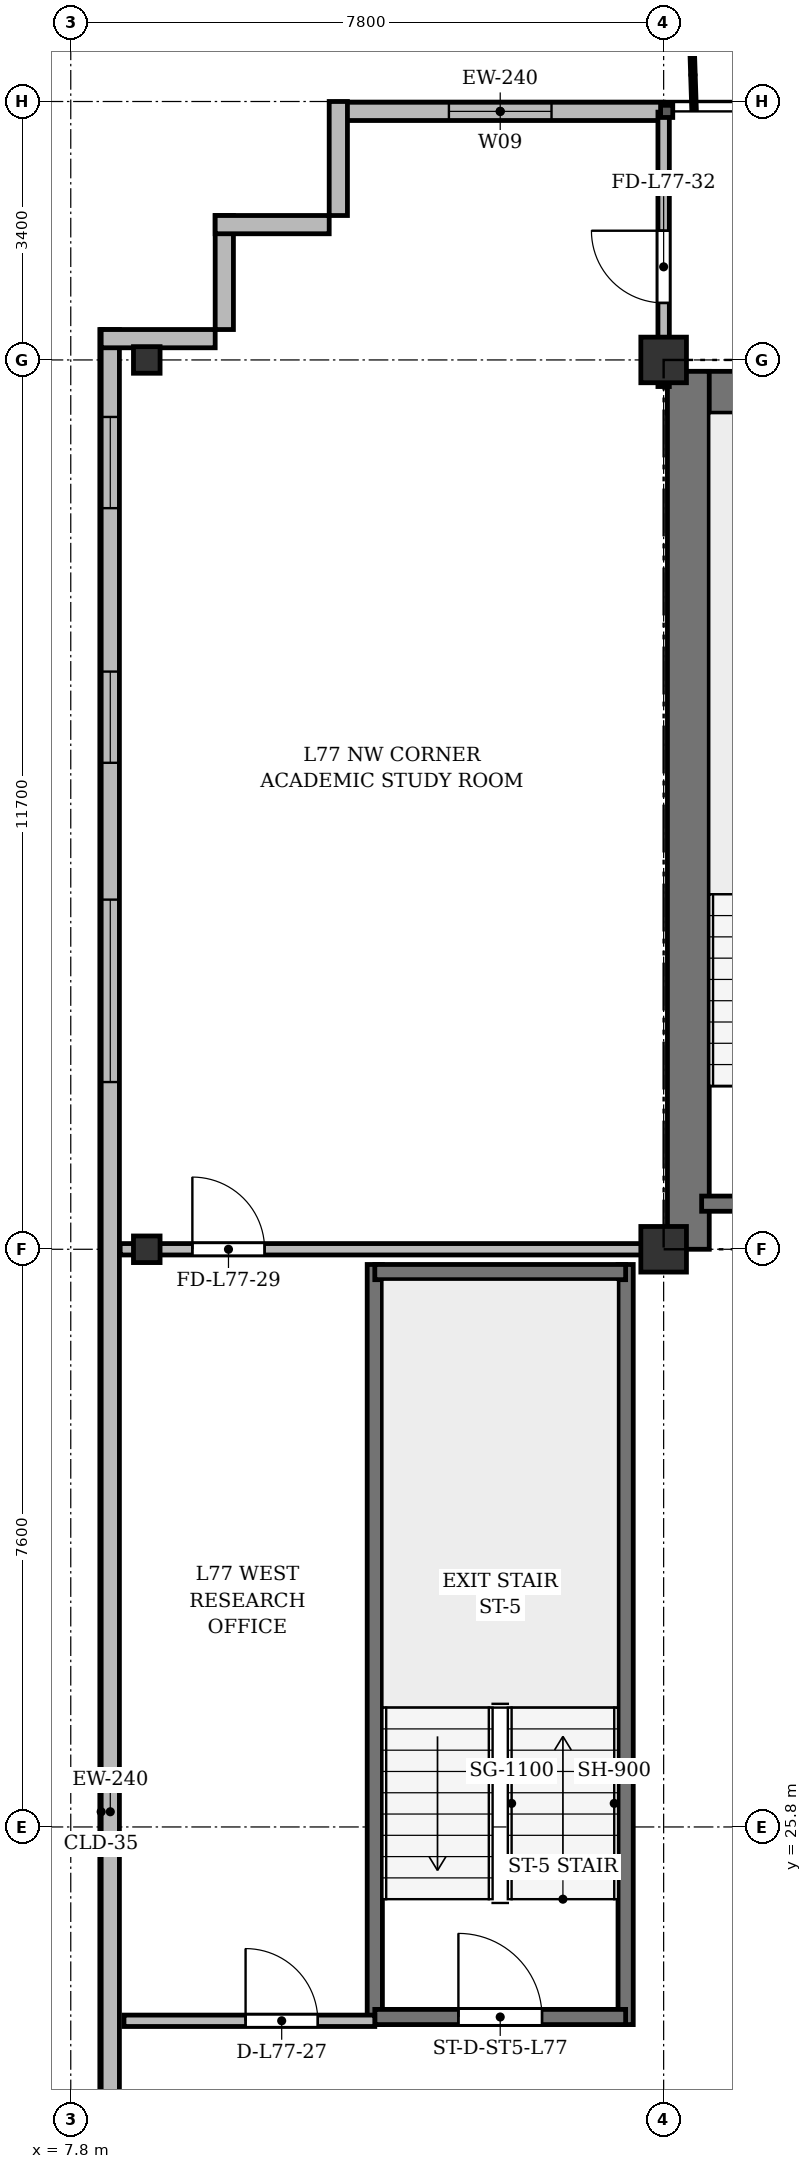
"""IFC4 building model, lengths in metres.
Left out: names, types, materials, properties, quantities, classifications, styles, units other than length and angle.
Written with IfcOpenShell. Run it as: python <this file> out.ifc"""

import sys

from ifc_helpers import new_model, si_unit, direction, frame, frame_2d, origin, origin_2d, place, context, subcontext, project, spatial, rectangle, i_section, extrude, source, transform, mapped, element, fill, save


model = new_model("IFC4")
c1 = context("Model", 3, precision=1e-05, world=origin(), true_north=direction((0.0, 1.0)))
c2 = subcontext(c1, "Body", "Model", "MODEL_VIEW")
j1 = project(units=[si_unit("LENGTHUNIT", "METRE"), si_unit("PLANEANGLEUNIT", "RADIAN")], contexts=[c1])
p1 = place(None, origin())
s1 = spatial("IfcSite", under=j1, at=p1, CompositionType="ELEMENT")
p2 = place(p1, origin())
s2 = spatial("IfcBuilding", under=s1, at=p2, CompositionType="ELEMENT")
p3 = place(p2, frame((0.0, 0.0, 295.5)))
s3 = spatial("IfcBuildingStorey", under=s2, at=p3, CompositionType="ELEMENT", Elevation=295.5)
m1 = source(origin(), c2, "Body", "SweptSolid", [
    extrude(i_section(OverallWidth=0.35, OverallDepth=0.35, WebThickness=0.018, FlangeThickness=0.028, at=origin_2d()), origin(), (0.0, 0.0, 1.0), 3.6),
])
for number, where, z_axis, x_axis in (
    (1, (8.8, 33.4, 0.0), (0.0, 0.0, 1.0), (1.0, 0.0, 0.0)),
    (2, (8.8, 45.1, 0.0), (0.0, 0.0, 1.0), (1.0, 0.0, 0.0)),
):
    element("IfcColumn", number, at=place(p3, frame(where, z_axis=z_axis, x_axis=x_axis)), inside=s3, PredefinedType="COLUMN", context=c2, shape_type="MappedRepresentation", body=[
        mapped(m1, transform((0.0, 0.0, 0.0), x_axis=(1.0, 0.0, 0.0), y_axis=(0.0, 1.0, 0.0), z_axis=(0.0, 0.0, 1.0), scale=1.0)),
    ])
m2 = source(origin(), c2, "Body", "SweptSolid", [
    extrude(rectangle(XDim=0.6, YDim=0.6, at=origin_2d()), origin(), (0.0, 0.0, 1.0), 3.6),
])
for number, where, z_axis, x_axis in (
    (3, (15.6, 33.4, 0.0), (0.0, 0.0, 1.0), (1.0, 0.0, 0.0)),
    (4, (15.6, 45.1, 0.0), (0.0, 0.0, 1.0), (1.0, 0.0, 0.0)),
):
    element("IfcColumn", number, at=place(p3, frame(where, z_axis=z_axis, x_axis=x_axis)), inside=s3, PredefinedType="COLUMN", context=c2, shape_type="MappedRepresentation", body=[
        mapped(m2, transform((0.0, 0.0, 0.0), x_axis=(1.0, 0.0, 0.0), y_axis=(0.0, 1.0, 0.0), z_axis=(0.0, 0.0, 1.0), scale=1.0)),
    ])
p4 = place(p3, frame((11.3, 48.37, 0.0), z_axis=(0.0, 0.0, 1.0), x_axis=(1.0, 0.0, 0.0)))
e5 = element("IfcWall", 5, at=p4, inside=s3, PredefinedType="SOLIDWALL", context=c2, shape_type="SweptSolid", body=[
    extrude(rectangle(XDim=4.3, YDim=0.24, at=frame_2d((2.15, 0.0))), origin(), (0.0, 0.0, 1.0), 3.26),
])
p5 = place(p4, frame((1.475, 0.0, 0.9)))
e6 = element("IfcOpeningElement", 6, at=p5, cuts=e5, PredefinedType="OPENING", context=c2, shape_type="SweptSolid", body=[
    extrude(rectangle(XDim=1.35, YDim=1.5, at=frame_2d((0.675, 0.75))), frame((0.0, 0.13, 0.0), z_axis=(0.0, -1.0, 0.0), x_axis=(1.0, 0.0, 0.0)), (0.0, 0.0, 1.0), 0.26),
])
p6 = place(p3, frame((8.32, 6.5, 0.0), z_axis=(0.0, 0.0, 1.0), x_axis=(0.0, 1.0, 0.0)))
e7 = element("IfcWall", 7, at=p6, inside=s3, PredefinedType="SOLIDWALL", context=c2, shape_type="SweptSolid", body=[
    extrude(rectangle(XDim=39.0, YDim=0.24, at=frame_2d((19.5, 0.0))), origin(), (0.0, 0.0, 1.0), 3.26),
])
p7 = place(p6, frame((1.45, 0.0, 0.92)))
e8 = element("IfcOpeningElement", 8, at=p7, cuts=e7, PredefinedType="OPENING", context=c2, shape_type="SweptSolid", body=[
    extrude(rectangle(XDim=1.2, YDim=1.65, at=frame_2d((0.6, 0.825))), frame((0.0, 0.13, 0.0), z_axis=(0.0, -1.0, 0.0), x_axis=(1.0, 0.0, 0.0)), (0.0, 0.0, 1.0), 0.26),
])
p8 = place(p6, frame((3.7, 0.0, 0.92)))
e9 = element("IfcOpeningElement", 9, at=p8, cuts=e7, PredefinedType="OPENING", context=c2, shape_type="SweptSolid", body=[
    extrude(rectangle(XDim=2.4, YDim=2.1, at=frame_2d((1.2, 1.05))), frame((0.0, 0.13, 0.0), z_axis=(0.0, -1.0, 0.0), x_axis=(1.0, 0.0, 0.0)), (0.0, 0.0, 1.0), 0.26),
])
p9 = place(p6, frame((7.9, 0.0, 0.92)))
e10 = element("IfcOpeningElement", 10, at=p9, cuts=e7, PredefinedType="OPENING", context=c2, shape_type="SweptSolid", body=[
    extrude(rectangle(XDim=2.4, YDim=2.1, at=frame_2d((1.2, 1.05))), frame((0.0, 0.13, 0.0), z_axis=(0.0, -1.0, 0.0), x_axis=(1.0, 0.0, 0.0)), (0.0, 0.0, 1.0), 0.26),
])
p10 = place(p6, frame((29.1, 0.0, 0.92)))
e11 = element("IfcOpeningElement", 11, at=p10, cuts=e7, PredefinedType="OPENING", context=c2, shape_type="SweptSolid", body=[
    extrude(rectangle(XDim=2.4, YDim=2.1, at=frame_2d((1.2, 1.05))), frame((0.0, 0.13, 0.0), z_axis=(0.0, -1.0, 0.0), x_axis=(1.0, 0.0, 0.0)), (0.0, 0.0, 1.0), 0.26),
])
p11 = place(p6, frame((33.3, 0.0, 0.92)))
e12 = element("IfcOpeningElement", 12, at=p11, cuts=e7, PredefinedType="OPENING", context=c2, shape_type="SweptSolid", body=[
    extrude(rectangle(XDim=1.2, YDim=1.65, at=frame_2d((0.6, 0.825))), frame((0.0, 0.13, 0.0), z_axis=(0.0, -1.0, 0.0), x_axis=(1.0, 0.0, 0.0)), (0.0, 0.0, 1.0), 0.26),
])
p12 = place(p6, frame((36.65, 0.0, 0.92)))
e13 = element("IfcOpeningElement", 13, at=p12, cuts=e7, PredefinedType="OPENING", context=c2, shape_type="SweptSolid", body=[
    extrude(rectangle(XDim=1.2, YDim=1.65, at=frame_2d((0.6, 0.825))), frame((0.0, 0.13, 0.0), z_axis=(0.0, -1.0, 0.0), x_axis=(1.0, 0.0, 0.0)), (0.0, 0.0, 1.0), 0.26),
])
for number, where, z_axis, x_axis in (
    (14, (8.2, 45.38, 0.0), (0.0, 0.0, 1.0), (1.0, 0.0, 0.0)),
    (15, (9.82, 45.5, 0.0), (0.0, 0.0, 1.0), (0.0, 1.0, 0.0)),
    (16, (9.7, 46.88, 0.0), (0.0, 0.0, 1.0), (1.0, 0.0, 0.0)),
    (17, (11.32, 47.0, 0.0), (0.0, 0.0, 1.0), (0.0, 1.0, 0.0)),
):
    element("IfcWall", number, at=place(p3, frame(where, z_axis=z_axis, x_axis=x_axis)), inside=s3, PredefinedType="SOLIDWALL", context=c2, shape_type="SweptSolid", body=[
        extrude(rectangle(XDim=1.5, YDim=0.24, at=frame_2d((0.75, 0.0))), origin(), (0.0, 0.0, 1.0), 3.26),
    ])
p13 = place(p3, frame((15.65, 44.675, 0.0), z_axis=(0.0, 0.0, 1.0), x_axis=(1.0, 0.0, 0.0)))
e18 = element("IfcWall", 18, at=p13, inside=s3, PredefinedType="SHEAR", context=c2, shape_type="SweptSolid", body=[
    extrude(rectangle(XDim=43.1, YDim=0.55, at=frame_2d((21.55, 0.0))), origin(), (0.0, 0.0, 1.0), 3.26),
])
p14 = place(p3, frame((15.925, 33.4, 0.0), z_axis=(0.0, 0.0, 1.0), x_axis=(0.0, 1.0, 0.0)))
e19 = element("IfcWall", 19, at=p14, inside=s3, PredefinedType="SHEAR", context=c2, shape_type="SweptSolid", body=[
    extrude(rectangle(XDim=11.55, YDim=0.55, at=frame_2d((5.775, 0.0))), origin(), (0.0, 0.0, 1.0), 3.26),
])
p15 = place(p3, frame((16.1, 34.0, 0.0), z_axis=(0.0, 0.0, 1.0), x_axis=(1.0, 0.0, 0.0)))
e20 = element("IfcWall", 20, at=p15, inside=s3, PredefinedType="SHEAR", context=c2, shape_type="SweptSolid", body=[
    extrude(rectangle(XDim=3.4, YDim=0.2, at=frame_2d((1.7, 0.0))), origin(), (0.0, 0.0, 1.0), 3.26),
])
for number, where, z_axis, x_axis in (
    (21, (11.8, 23.2, 0.0), (0.0, 0.0, 1.0), (0.0, 1.0, 0.0)),
    (22, (15.1, 23.2, 0.0), (0.0, 0.0, 1.0), (0.0, 1.0, 0.0)),
):
    element("IfcWall", number, at=place(p3, frame(where, z_axis=z_axis, x_axis=x_axis)), inside=s3, PredefinedType="SHEAR", context=c2, shape_type="SweptSolid", body=[
        extrude(rectangle(XDim=10.0, YDim=0.2, at=frame_2d((5.0, 0.0))), origin(), (0.0, 0.0, 1.0), 3.26),
    ])
p16 = place(p3, frame((11.8, 33.1, 0.0), z_axis=(0.0, 0.0, 1.0), x_axis=(1.0, 0.0, 0.0)))
e23 = element("IfcWall", 23, at=p16, inside=s3, PredefinedType="SHEAR", context=c2, shape_type="SweptSolid", body=[
    extrude(rectangle(XDim=3.3, YDim=0.2, at=frame_2d((1.65, 0.0))), origin(), (0.0, 0.0, 1.0), 3.26),
])
p17 = place(p3, frame((11.8, 23.3, 0.0), z_axis=(0.0, 0.0, 1.0), x_axis=(1.0, 0.0, 0.0)))
e24 = element("IfcWall", 24, at=p17, inside=s3, PredefinedType="SHEAR", context=c2, shape_type="SweptSolid", body=[
    extrude(rectangle(XDim=3.3, YDim=0.2, at=frame_2d((1.65, 0.0))), origin(), (0.0, 0.0, 1.0), 3.26),
])
p18 = place(p17, frame((1.1, 0.0, 0.0)))
e25 = element("IfcOpeningElement", 25, at=p18, cuts=e24, PredefinedType="OPENING", context=c2, shape_type="SweptSolid", body=[
    extrude(rectangle(XDim=1.1, YDim=2.15, at=frame_2d((0.55, 1.075))), frame((0.0, 0.11, 0.0), z_axis=(0.0, -1.0, 0.0), x_axis=(1.0, 0.0, 0.0)), (0.0, 0.0, 1.0), 0.22),
])
p19 = place(p3, frame((8.5, 23.25, 0.0), z_axis=(0.0, 0.0, 1.0), x_axis=(1.0, 0.0, 0.0)))
e26 = element("IfcWall", 26, at=p19, inside=s3, PredefinedType="PARTITIONING", context=c2, shape_type="SweptSolid", body=[
    extrude(rectangle(XDim=3.3, YDim=0.15, at=frame_2d((1.65, 0.0))), origin(), (0.0, 0.0, 1.0), 2.76),
])
p20 = place(p19, frame((1.6, 0.0, 0.0)))
e27 = element("IfcOpeningElement", 27, at=p20, cuts=e26, PredefinedType="OPENING", context=c2, shape_type="SweptSolid", body=[
    extrude(rectangle(XDim=0.95, YDim=2.15, at=frame_2d((0.475, 1.075))), frame((0.0, 0.085, 0.0), z_axis=(0.0, -1.0, 0.0), x_axis=(1.0, 0.0, 0.0)), (0.0, 0.0, 1.0), 0.17),
])
p21 = place(p3, frame((8.45, 33.4, 0.0), z_axis=(0.0, 0.0, 1.0), x_axis=(1.0, 0.0, 0.0)))
e28 = element("IfcWall", 28, at=p21, inside=s3, PredefinedType="PARTITIONING", context=c2, shape_type="SweptSolid", body=[
    extrude(rectangle(XDim=7.15, YDim=0.15, at=frame_2d((3.575, 0.0))), origin(), (0.0, 0.0, 1.0), 2.81),
])
p22 = place(p21, frame((0.95, 0.0, 0.0)))
e29 = element("IfcOpeningElement", 29, at=p22, cuts=e28, PredefinedType="OPENING", context=c2, shape_type="SweptSolid", body=[
    extrude(rectangle(XDim=0.95, YDim=2.15, at=frame_2d((0.475, 1.075))), frame((0.0, 0.085, 0.0), z_axis=(0.0, -1.0, 0.0), x_axis=(1.0, 0.0, 0.0)), (0.0, 0.0, 1.0), 0.17),
])
p23 = place(p3, frame((15.6, 44.75, 0.0), z_axis=(0.0, 0.0, 1.0), x_axis=(0.0, 1.0, 0.0)))
e30 = element("IfcWall", 30, at=p23, inside=s3, PredefinedType="PARTITIONING", context=c2, shape_type="SweptSolid", body=[
    extrude(rectangle(XDim=3.61, YDim=0.15, at=frame_2d((1.805, 0.0))), origin(), (0.0, 0.0, 1.0), 2.76),
])
p24 = place(p23, frame((1.1, 0.0, 0.0)))
e31 = element("IfcOpeningElement", 31, at=p24, cuts=e30, PredefinedType="OPENING", context=c2, shape_type="SweptSolid", body=[
    extrude(rectangle(XDim=0.95, YDim=2.15, at=frame_2d((0.475, 1.075))), frame((0.0, 0.085, 0.0), z_axis=(0.0, -1.0, 0.0), x_axis=(1.0, 0.0, 0.0)), (0.0, 0.0, 1.0), 0.17),
])
m3 = source(origin(), c2, "Body", "SweptSolid", [
    extrude(rectangle(XDim=1.35, YDim=1.5, at=frame_2d((0.675, 0.75))), frame((0.0, 0.03, 0.0), z_axis=(0.0, -1.0, 0.0), x_axis=(1.0, 0.0, 0.0)), (0.0, 0.0, 1.0), 0.06),
])
p25 = place(p5, origin())
e32 = element("IfcWindow", 32, at=p25, inside=s3, PartitioningType="SINGLE_PANEL", PredefinedType="WINDOW", context=c2, shape_type="MappedRepresentation", body=[
    mapped(m3, transform((0.0, 0.0, 0.0), x_axis=(1.0, 0.0, 0.0), y_axis=(0.0, 1.0, 0.0), z_axis=(0.0, 0.0, 1.0), scale=1.0)),
])
fill(e6, e32)
m4 = source(origin(), c2, "Body", "SweptSolid", [
    extrude(rectangle(XDim=2.4, YDim=2.1, at=frame_2d((1.2, 1.05))), frame((0.0, 0.03, 0.0), z_axis=(0.0, -1.0, 0.0), x_axis=(1.0, 0.0, 0.0)), (0.0, 0.0, 1.0), 0.06),
])
p26 = place(p10, origin())
e33 = element("IfcWindow", 33, at=p26, inside=s3, PartitioningType="SINGLE_PANEL", PredefinedType="WINDOW", context=c2, shape_type="MappedRepresentation", body=[
    mapped(m4, transform((0.0, 0.0, 0.0), x_axis=(1.0, 0.0, 0.0), y_axis=(0.0, 1.0, 0.0), z_axis=(0.0, 0.0, 1.0), scale=1.0)),
])
fill(e11, e33)
m5 = source(origin(), c2, "Body", "SweptSolid", [
    extrude(rectangle(XDim=1.2, YDim=1.65, at=frame_2d((0.6, 0.825))), frame((0.0, 0.03, 0.0), z_axis=(0.0, -1.0, 0.0), x_axis=(1.0, 0.0, 0.0)), (0.0, 0.0, 1.0), 0.06),
])
p27 = place(p11, origin())
e34 = element("IfcWindow", 34, at=p27, inside=s3, PartitioningType="SINGLE_PANEL", PredefinedType="WINDOW", context=c2, shape_type="MappedRepresentation", body=[
    mapped(m5, transform((0.0, 0.0, 0.0), x_axis=(1.0, 0.0, 0.0), y_axis=(0.0, 1.0, 0.0), z_axis=(0.0, 0.0, 1.0), scale=1.0)),
])
fill(e12, e34)
p28 = place(p12, origin())
e35 = element("IfcWindow", 35, at=p28, inside=s3, PartitioningType="SINGLE_PANEL", PredefinedType="WINDOW", context=c2, shape_type="MappedRepresentation", body=[
    mapped(m5, transform((0.0, 0.0, 0.0), x_axis=(1.0, 0.0, 0.0), y_axis=(0.0, 1.0, 0.0), z_axis=(0.0, 0.0, 1.0), scale=1.0)),
])
fill(e13, e35)
m6 = source(origin(), c2, "Body", "SweptSolid", [
    extrude(rectangle(XDim=1.1, YDim=2.15, at=frame_2d((0.55, 1.075))), frame((0.0, 0.025, 0.0), z_axis=(0.0, -1.0, 0.0), x_axis=(1.0, 0.0, 0.0)), (0.0, 0.0, 1.0), 0.05),
])
p29 = place(p18, origin())
e36 = element("IfcDoor", 36, at=p29, inside=s3, OperationType="SINGLE_SWING_LEFT", PredefinedType="DOOR", context=c2, shape_type="MappedRepresentation", body=[
    mapped(m6, transform((0.0, 0.0, 0.0), x_axis=(1.0, 0.0, 0.0), y_axis=(0.0, 1.0, 0.0), z_axis=(0.0, 0.0, 1.0), scale=1.0)),
])
fill(e25, e36)
m7 = source(origin(), c2, "Body", "SweptSolid", [
    extrude(rectangle(XDim=0.95, YDim=2.15, at=frame_2d((0.475, 1.075))), frame((0.0, 0.025, 0.0), z_axis=(0.0, -1.0, 0.0), x_axis=(1.0, 0.0, 0.0)), (0.0, 0.0, 1.0), 0.05),
])
p30 = place(p20, origin())
e37 = element("IfcDoor", 37, at=p30, inside=s3, OperationType="SINGLE_SWING_LEFT", PredefinedType="DOOR", context=c2, shape_type="MappedRepresentation", body=[
    mapped(m7, transform((0.0, 0.0, 0.0), x_axis=(1.0, 0.0, 0.0), y_axis=(0.0, 1.0, 0.0), z_axis=(0.0, 0.0, 1.0), scale=1.0)),
])
fill(e27, e37)
p31 = place(p22, origin())
e38 = element("IfcDoor", 38, at=p31, inside=s3, OperationType="SINGLE_SWING_LEFT", PredefinedType="DOOR", context=c2, shape_type="MappedRepresentation", body=[
    mapped(m7, transform((0.0, 0.0, 0.0), x_axis=(1.0, 0.0, 0.0), y_axis=(0.0, 1.0, 0.0), z_axis=(0.0, 0.0, 1.0), scale=1.0)),
])
fill(e29, e38)
p32 = place(p24, origin())
e39 = element("IfcDoor", 39, at=p32, inside=s3, OperationType="SINGLE_SWING_RIGHT", PredefinedType="DOOR", context=c2, shape_type="MappedRepresentation", body=[
    mapped(m7, transform((0.0, 0.0, 0.0), x_axis=(1.0, 0.0, 0.0), y_axis=(0.0, 1.0, 0.0), z_axis=(0.0, 0.0, 1.0), scale=1.0)),
])
fill(e31, e39)
save(model, sys.argv[1])
